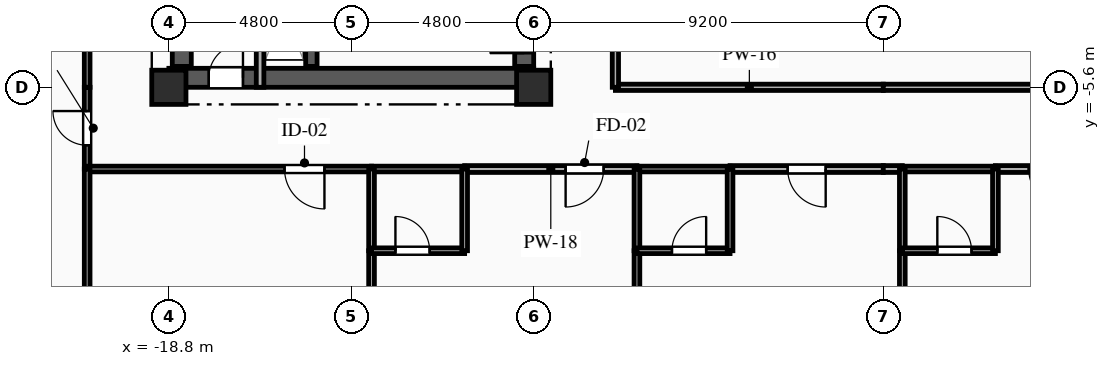
"""IFC4 building model, lengths in metres.
Left out: names, types, materials, properties, quantities, classifications, styles, units other than length and angle.
Written with IfcOpenShell. Run it as: python <this file> out.ifc"""

import sys

from ifc_helpers import new_model, si_unit, direction, frame, frame_2d, origin, origin_2d, place, context, subcontext, project, spatial, rectangle, extrude, element, fill, save


model = new_model("IFC4")
c1 = context("Model", 3, precision=1e-05, world=origin(), true_north=direction((0.0, 1.0)))
c2 = subcontext(c1, "Body", "Model", "MODEL_VIEW")
j1 = project(units=[si_unit("LENGTHUNIT", "METRE"), si_unit("PLANEANGLEUNIT", "RADIAN")], contexts=[c1])
p1 = place(None, origin())
s1 = spatial("IfcSite", under=j1, at=p1, CompositionType="ELEMENT")
p2 = place(p1, origin())
s2 = spatial("IfcBuilding", under=s1, at=p2, CompositionType="ELEMENT")
p3 = place(p2, frame((0.0, 0.0, 161.15)))
s3 = spatial("IfcBuildingStorey", under=s2, at=p3, CompositionType="ELEMENT", Elevation=161.15)
for number, where, z_axis, x_axis in (
    (1, (-18.8, -5.6, 0.0), (0.0, 0.0, 1.0), (1.0, 0.0, 0.0)),
    (2, (-9.2, -5.6, 0.0), (0.0, 0.0, 1.0), (1.0, 0.0, 0.0)),
):
    element("IfcColumn", number, at=place(p3, frame(where, z_axis=z_axis, x_axis=x_axis)), inside=s3, PredefinedType="COLUMN", context=c2, shape_type="SweptSolid", body=[
        extrude(rectangle(XDim=0.9, YDim=0.9, at=origin_2d()), origin(), (0.0, 0.0, 1.0), 3.35),
    ])
p4 = place(p3, frame((-18.8, -5.35, 0.0), z_axis=(0.0, 0.0, 1.0), x_axis=(1.0, 0.0, 0.0)))
e3 = element("IfcWall", 3, at=p4, inside=s3, PredefinedType="SHEAR", context=c2, shape_type="SweptSolid", body=[
    extrude(rectangle(XDim=9.6, YDim=0.5, at=frame_2d((4.8, 0.0))), origin(), (0.0, 0.0, 1.0), 3.04),
])
p5 = place(p4, frame((1.05, 0.0, 0.0)))
e4 = element("IfcOpeningElement", 4, at=p5, cuts=e3, PredefinedType="OPENING", context=c2, shape_type="SweptSolid", body=[
    extrude(rectangle(XDim=0.9, YDim=2.1, at=frame_2d((0.45, 1.05))), frame((0.0, 0.26, 0.0), z_axis=(0.0, -1.0, 0.0), x_axis=(1.0, 0.0, 0.0)), (0.0, 0.0, 1.0), 0.52),
])
p6 = place(p3, frame((-18.46, -5.05, 0.0), z_axis=(0.0, 0.0, 1.0), x_axis=(0.0, 1.0, 0.0)))
e5 = element("IfcWall", 5, at=p6, inside=s3, PredefinedType="SHEAR", context=c2, shape_type="SweptSolid", body=[
    extrude(rectangle(XDim=10.1, YDim=0.5, at=frame_2d((5.05, 0.0))), origin(), (0.0, 0.0, 1.0), 3.04),
])
p7 = place(p3, frame((-9.45, -5.05, 0.0), z_axis=(0.0, 0.0, 1.0), x_axis=(0.0, 1.0, 0.0)))
e6 = element("IfcWall", 6, at=p7, inside=s3, PredefinedType="SHEAR", context=c2, shape_type="SweptSolid", body=[
    extrude(rectangle(XDim=10.1, YDim=0.5, at=frame_2d((5.05, 0.0))), origin(), (0.0, 0.0, 1.0), 3.04),
])
p8 = place(p7, frame((7.15, 0.0, 0.0)))
e7 = element("IfcOpeningElement", 7, at=p8, cuts=e6, PredefinedType="OPENING", context=c2, shape_type="SweptSolid", body=[
    extrude(rectangle(XDim=0.9, YDim=2.1, at=frame_2d((0.45, 1.05))), frame((0.0, 0.26, 0.0), z_axis=(0.0, -1.0, 0.0), x_axis=(1.0, 0.0, 0.0)), (0.0, 0.0, 1.0), 0.52),
])
p9 = place(p7, frame((2.4, 0.0, 0.0)))
e8 = element("IfcOpeningElement", 8, at=p9, cuts=e6, PredefinedType="OPENING", context=c2, shape_type="SweptSolid", body=[
    extrude(rectangle(XDim=1.2, YDim=2.15, at=frame_2d((0.6, 1.075))), frame((0.0, 0.26, 0.0), z_axis=(0.0, -1.0, 0.0), x_axis=(1.0, 0.0, 0.0)), (0.0, 0.0, 1.0), 0.52),
])
p10 = place(p7, frame((0.35, 0.0, 0.0)))
e9 = element("IfcOpeningElement", 9, at=p10, cuts=e6, PredefinedType="OPENING", context=c2, shape_type="SweptSolid", body=[
    extrude(rectangle(XDim=0.9, YDim=2.1, at=frame_2d((0.45, 1.05))), frame((0.0, 0.26, 0.0), z_axis=(0.0, -1.0, 0.0), x_axis=(1.0, 0.0, 0.0)), (0.0, 0.0, 1.0), 0.52),
])
p11 = place(p7, frame((5.0, 0.0, 0.0)))
e10 = element("IfcOpeningElement", 10, at=p11, cuts=e6, PredefinedType="OPENING", context=c2, shape_type="SweptSolid", body=[
    extrude(rectangle(XDim=0.9, YDim=2.1, at=frame_2d((0.45, 1.05))), frame((0.0, 0.26, 0.0), z_axis=(0.0, -1.0, 0.0), x_axis=(1.0, 0.0, 0.0)), (0.0, 0.0, 1.0), 0.52),
])
p12 = place(p3, frame((-15.05, -5.05, 0.0), z_axis=(0.0, 0.0, 1.0), x_axis=(0.0, 1.0, 0.0)))
e11 = element("IfcWall", 11, at=p12, inside=s3, PredefinedType="SHEAR", context=c2, shape_type="SweptSolid", body=[
    extrude(rectangle(XDim=10.1, YDim=0.3, at=frame_2d((5.05, 0.0))), origin(), (0.0, 0.0, 1.0), 3.04),
])
p13 = place(p3, frame((-16.4, -5.6, 0.0), z_axis=(0.0, 0.0, 1.0), x_axis=(0.0, 1.0, 0.0)))
e12 = element("IfcWall", 12, at=p13, inside=s3, PredefinedType="PARTITIONING", context=c2, shape_type="SweptSolid", body=[
    extrude(rectangle(XDim=3.49, YDim=0.2, at=frame_2d((1.745, 0.0))), origin(), (0.0, 0.0, 1.0), 3.04),
])
p14 = place(p3, frame((-20.95, -7.75, 0.0), z_axis=(0.0, 0.0, 1.0), x_axis=(0.0, 1.0, 0.0)))
e13 = element("IfcWall", 13, at=p14, inside=s3, PredefinedType="PARTITIONING", context=c2, shape_type="SweptSolid", body=[
    extrude(rectangle(XDim=2.15, YDim=0.15, at=frame_2d((1.075, 0.0))), origin(), (0.0, 0.0, 1.0), 3.04),
])
p15 = place(p14, frame((0.625, 0.0, 0.0)))
e14 = element("IfcOpeningElement", 14, at=p15, cuts=e13, PredefinedType="OPENING", context=c2, shape_type="SweptSolid", body=[
    extrude(rectangle(XDim=0.9, YDim=2.1, at=frame_2d((0.45, 1.05))), frame((0.0, 0.085, 0.0), z_axis=(0.0, -1.0, 0.0), x_axis=(1.0, 0.0, 0.0)), (0.0, 0.0, 1.0), 0.17),
])
p16 = place(p3, frame((-13.467, -7.75, 0.0), z_axis=(0.0, 0.0, 1.0), x_axis=(-1.0, 0.0, 0.0)))
e15 = element("IfcWall", 15, at=p16, inside=s3, PredefinedType="PARTITIONING", context=c2, shape_type="SweptSolid", body=[
    extrude(rectangle(XDim=7.483, YDim=0.15, at=frame_2d((3.741, 0.0))), origin(), (0.0, 0.0, 1.0), 3.04),
])
p17 = place(p16, frame((1.239, 0.0, 0.0)))
e16 = element("IfcOpeningElement", 16, at=p17, cuts=e15, PredefinedType="OPENING", context=c2, shape_type="SweptSolid", body=[
    extrude(rectangle(XDim=1.05, YDim=2.15, at=frame_2d((0.525, 1.075))), frame((0.0, 0.085, 0.0), z_axis=(0.0, -1.0, 0.0), x_axis=(1.0, 0.0, 0.0)), (0.0, 0.0, 1.0), 0.17),
])
p18 = place(p3, frame((-6.483, -7.75, 0.0), z_axis=(0.0, 0.0, 1.0), x_axis=(-1.0, 0.0, 0.0)))
e17 = element("IfcWall", 17, at=p18, inside=s3, PredefinedType="PARTITIONING", context=c2, shape_type="SweptSolid", body=[
    extrude(rectangle(XDim=4.534, YDim=0.18, at=frame_2d((2.267, 0.0))), origin(), (0.0, 0.0, 1.0), 3.04),
])
p19 = place(p18, frame((0.877, 0.0, 0.0)))
e18 = element("IfcOpeningElement", 18, at=p19, cuts=e17, PredefinedType="OPENING", context=c2, shape_type="SweptSolid", body=[
    extrude(rectangle(XDim=1.0, YDim=2.15, at=frame_2d((0.5, 1.075))), frame((0.0, 0.1, 0.0), z_axis=(0.0, -1.0, 0.0), x_axis=(1.0, 0.0, 0.0)), (0.0, 0.0, 1.0), 0.2),
])
p20 = place(p3, frame((-11.017, -7.75, 0.0), z_axis=(0.0, 0.0, 1.0), x_axis=(-1.0, 0.0, 0.0)))
e19 = element("IfcWall", 19, at=p20, inside=s3, PredefinedType="PLUMBINGWALL", context=c2, shape_type="SweptSolid", body=[
    extrude(rectangle(XDim=2.45, YDim=0.15, at=frame_2d((1.225, 0.0))), origin(), (0.0, 0.0, 1.0), 3.04),
])
p21 = place(p3, frame((0.0, -7.75, 0.0), z_axis=(0.0, 0.0, 1.0), x_axis=(-1.0, 0.0, 0.0)))
e20 = element("IfcWall", 20, at=p21, inside=s3, PredefinedType="PARTITIONING", context=c2, shape_type="SweptSolid", body=[
    extrude(rectangle(XDim=4.033, YDim=0.18, at=frame_2d((2.017, 0.0))), origin(), (0.0, 0.0, 1.0), 3.04),
])
p22 = place(p21, frame((1.517, 0.0, 0.0)))
e21 = element("IfcOpeningElement", 21, at=p22, cuts=e20, PredefinedType="OPENING", context=c2, shape_type="SweptSolid", body=[
    extrude(rectangle(XDim=1.0, YDim=2.15, at=frame_2d((0.5, 1.075))), frame((0.0, 0.1, 0.0), z_axis=(0.0, -1.0, 0.0), x_axis=(1.0, 0.0, 0.0)), (0.0, 0.0, 1.0), 0.2),
])
p23 = place(p3, frame((-4.033, -7.75, 0.0), z_axis=(0.0, 0.0, 1.0), x_axis=(-1.0, 0.0, 0.0)))
e22 = element("IfcWall", 22, at=p23, inside=s3, PredefinedType="PLUMBINGWALL", context=c2, shape_type="SweptSolid", body=[
    extrude(rectangle(XDim=2.45, YDim=0.15, at=frame_2d((1.225, 0.0))), origin(), (0.0, 0.0, 1.0), 3.04),
])
p24 = place(p3, frame((-7.05, -5.6, 0.0), z_axis=(0.0, 0.0, 1.0), x_axis=(1.0, 0.0, 0.0)))
e23 = element("IfcWall", 23, at=p24, inside=s3, PredefinedType="PARTITIONING", context=c2, shape_type="SweptSolid", body=[
    extrude(rectangle(XDim=7.05, YDim=0.165, at=frame_2d((3.525, 0.0))), origin(), (0.0, 0.0, 1.0), 2.525),
])
p25 = place(p3, frame((0.5, -7.75, 0.0), z_axis=(0.0, 0.0, 1.0), x_axis=(-1.0, 0.0, 0.0)))
e24 = element("IfcWall", 24, at=p25, inside=s3, PredefinedType="PARTITIONING", context=c2, shape_type="SweptSolid", body=[
    extrude(rectangle(XDim=0.5, YDim=0.18, at=frame_2d((0.25, 0.0))), origin(), (0.0, 0.0, 1.0), 3.04),
])
p26 = place(p3, frame((7.483, -7.75, 0.0), z_axis=(0.0, 0.0, 1.0), x_axis=(-1.0, 0.0, 0.0)))
e25 = element("IfcWall", 25, at=p26, inside=s3, PredefinedType="PARTITIONING", context=c2, shape_type="SweptSolid", body=[
    extrude(rectangle(XDim=4.533, YDim=0.18, at=frame_2d((2.267, 0.0))), origin(), (0.0, 0.0, 1.0), 3.04),
])
p27 = place(p26, frame((2.656, 0.0, 0.0)))
e26 = element("IfcOpeningElement", 26, at=p27, cuts=e25, PredefinedType="OPENING", context=c2, shape_type="SweptSolid", body=[
    extrude(rectangle(XDim=1.0, YDim=2.15, at=frame_2d((0.5, 1.075))), frame((0.0, 0.1, 0.0), z_axis=(0.0, -1.0, 0.0), x_axis=(1.0, 0.0, 0.0)), (0.0, 0.0, 1.0), 0.2),
])
p28 = place(p3, frame((2.95, -7.75, 0.0), z_axis=(0.0, 0.0, 1.0), x_axis=(-1.0, 0.0, 0.0)))
e27 = element("IfcWall", 27, at=p28, inside=s3, PredefinedType="PLUMBINGWALL", context=c2, shape_type="SweptSolid", body=[
    extrude(rectangle(XDim=2.45, YDim=0.15, at=frame_2d((1.225, 0.0))), origin(), (0.0, 0.0, 1.0), 3.04),
])
p29 = place(p3, frame((0.0, -5.6, 0.0), z_axis=(0.0, 0.0, 1.0), x_axis=(1.0, 0.0, 0.0)))
e28 = element("IfcWall", 28, at=p29, inside=s3, PredefinedType="PARTITIONING", context=c2, shape_type="SweptSolid", body=[
    extrude(rectangle(XDim=7.05, YDim=0.165, at=frame_2d((3.525, 0.0))), origin(), (0.0, 0.0, 1.0), 2.525),
])
p30 = place(p3, frame((-20.95, -5.6, 0.0), z_axis=(0.0, 0.0, 1.0), x_axis=(0.0, 1.0, 0.0)))
e29 = element("IfcWall", 29, at=p30, inside=s3, PredefinedType="PARTITIONING", context=c2, shape_type="SweptSolid", body=[
    extrude(rectangle(XDim=2.14, YDim=0.15, at=frame_2d((1.07, 0.0))), origin(), (0.0, 0.0, 1.0), 3.04),
])
p31 = place(p3, frame((-7.05, -2.95, 0.0), z_axis=(0.0, 0.0, 1.0), x_axis=(0.0, -1.0, 0.0)))
e30 = element("IfcWall", 30, at=p31, inside=s3, PredefinedType="PARTITIONING", context=c2, shape_type="SweptSolid", body=[
    extrude(rectangle(XDim=2.65, YDim=0.165, at=frame_2d((1.325, 0.0))), origin(), (0.0, 0.0, 1.0), 3.04),
])
p32 = place(p3, frame((-20.95, -7.75, 0.0), z_axis=(0.0, 0.0, 1.0), x_axis=(0.0, -1.0, 0.0)))
e31 = element("IfcWall", 31, at=p32, inside=s3, PredefinedType="PARTITIONING", context=c2, shape_type="SweptSolid", body=[
    extrude(rectangle(XDim=7.85, YDim=0.15, at=frame_2d((3.925, 0.0))), origin(), (0.0, 0.0, 1.0), 3.04),
])
p33 = place(p3, frame((-13.467, -9.9, 0.0), z_axis=(0.0, 0.0, 1.0), x_axis=(0.0, -1.0, 0.0)))
e32 = element("IfcWall", 32, at=p33, inside=s3, PredefinedType="PARTITIONING", context=c2, shape_type="SweptSolid", body=[
    extrude(rectangle(XDim=5.7, YDim=0.15, at=frame_2d((2.85, 0.0))), origin(), (0.0, 0.0, 1.0), 3.04),
])
p34 = place(p3, frame((-13.467, -7.75, 0.0), z_axis=(0.0, 0.0, 1.0), x_axis=(0.0, -1.0, 0.0)))
e33 = element("IfcWall", 33, at=p34, inside=s3, PredefinedType="PLUMBINGWALL", context=c2, shape_type="SweptSolid", body=[
    extrude(rectangle(XDim=2.15, YDim=0.15, at=frame_2d((1.075, 0.0))), origin(), (0.0, 0.0, 1.0), 3.04),
])
p35 = place(p3, frame((-13.467, -9.9, 0.0), z_axis=(0.0, 0.0, 1.0), x_axis=(1.0, 0.0, 0.0)))
e34 = element("IfcWall", 34, at=p35, inside=s3, PredefinedType="PLUMBINGWALL", context=c2, shape_type="SweptSolid", body=[
    extrude(rectangle(XDim=2.45, YDim=0.15, at=frame_2d((1.225, 0.0))), origin(), (0.0, 0.0, 1.0), 3.04),
])
p36 = place(p35, frame((0.629, 0.0, 0.0)))
e35 = element("IfcOpeningElement", 35, at=p36, cuts=e34, PredefinedType="OPENING", context=c2, shape_type="SweptSolid", body=[
    extrude(rectangle(XDim=0.9, YDim=2.1, at=frame_2d((0.45, 1.05))), frame((0.0, 0.085, 0.0), z_axis=(0.0, -1.0, 0.0), x_axis=(1.0, 0.0, 0.0)), (0.0, 0.0, 1.0), 0.17),
])
p37 = place(p3, frame((-11.017, -9.9, 0.0), z_axis=(0.0, 0.0, 1.0), x_axis=(0.0, 1.0, 0.0)))
e36 = element("IfcWall", 36, at=p37, inside=s3, PredefinedType="PLUMBINGWALL", context=c2, shape_type="SweptSolid", body=[
    extrude(rectangle(XDim=2.15, YDim=0.15, at=frame_2d((1.075, 0.0))), origin(), (0.0, 0.0, 1.0), 3.04),
])
p38 = place(p3, frame((-6.483, -9.9, 0.0), z_axis=(0.0, 0.0, 1.0), x_axis=(0.0, -1.0, 0.0)))
e37 = element("IfcWall", 37, at=p38, inside=s3, PredefinedType="PARTITIONING", context=c2, shape_type="SweptSolid", body=[
    extrude(rectangle(XDim=5.7, YDim=0.15, at=frame_2d((2.85, 0.0))), origin(), (0.0, 0.0, 1.0), 3.04),
])
p39 = place(p3, frame((-6.483, -7.75, 0.0), z_axis=(0.0, 0.0, 1.0), x_axis=(0.0, -1.0, 0.0)))
e38 = element("IfcWall", 38, at=p39, inside=s3, PredefinedType="PLUMBINGWALL", context=c2, shape_type="SweptSolid", body=[
    extrude(rectangle(XDim=2.15, YDim=0.15, at=frame_2d((1.075, 0.0))), origin(), (0.0, 0.0, 1.0), 3.04),
])
p40 = place(p3, frame((-6.483, -9.9, 0.0), z_axis=(0.0, 0.0, 1.0), x_axis=(1.0, 0.0, 0.0)))
e39 = element("IfcWall", 39, at=p40, inside=s3, PredefinedType="PLUMBINGWALL", context=c2, shape_type="SweptSolid", body=[
    extrude(rectangle(XDim=2.45, YDim=0.15, at=frame_2d((1.225, 0.0))), origin(), (0.0, 0.0, 1.0), 3.04),
])
p41 = place(p40, frame((0.921, 0.0, 0.0)))
e40 = element("IfcOpeningElement", 40, at=p41, cuts=e39, PredefinedType="OPENING", context=c2, shape_type="SweptSolid", body=[
    extrude(rectangle(XDim=0.9, YDim=2.1, at=frame_2d((0.45, 1.05))), frame((0.0, 0.085, 0.0), z_axis=(0.0, -1.0, 0.0), x_axis=(1.0, 0.0, 0.0)), (0.0, 0.0, 1.0), 0.17),
])
p42 = place(p3, frame((-4.033, -9.9, 0.0), z_axis=(0.0, 0.0, 1.0), x_axis=(0.0, 1.0, 0.0)))
e41 = element("IfcWall", 41, at=p42, inside=s3, PredefinedType="PLUMBINGWALL", context=c2, shape_type="SweptSolid", body=[
    extrude(rectangle(XDim=2.15, YDim=0.15, at=frame_2d((1.075, 0.0))), origin(), (0.0, 0.0, 1.0), 3.04),
])
p43 = place(p3, frame((0.5, -9.9, 0.0), z_axis=(0.0, 0.0, 1.0), x_axis=(0.0, -1.0, 0.0)))
e42 = element("IfcWall", 42, at=p43, inside=s3, PredefinedType="PARTITIONING", context=c2, shape_type="SweptSolid", body=[
    extrude(rectangle(XDim=5.7, YDim=0.15, at=frame_2d((2.85, 0.0))), origin(), (0.0, 0.0, 1.0), 3.04),
])
p44 = place(p3, frame((0.5, -7.75, 0.0), z_axis=(0.0, 0.0, 1.0), x_axis=(0.0, -1.0, 0.0)))
e43 = element("IfcWall", 43, at=p44, inside=s3, PredefinedType="PLUMBINGWALL", context=c2, shape_type="SweptSolid", body=[
    extrude(rectangle(XDim=2.15, YDim=0.15, at=frame_2d((1.075, 0.0))), origin(), (0.0, 0.0, 1.0), 3.04),
])
p45 = place(p3, frame((0.5, -9.9, 0.0), z_axis=(0.0, 0.0, 1.0), x_axis=(1.0, 0.0, 0.0)))
e44 = element("IfcWall", 44, at=p45, inside=s3, PredefinedType="PLUMBINGWALL", context=c2, shape_type="SweptSolid", body=[
    extrude(rectangle(XDim=2.45, YDim=0.15, at=frame_2d((1.225, 0.0))), origin(), (0.0, 0.0, 1.0), 3.04),
])
p46 = place(p45, frame((0.921, 0.0, 0.0)))
e45 = element("IfcOpeningElement", 45, at=p46, cuts=e44, PredefinedType="OPENING", context=c2, shape_type="SweptSolid", body=[
    extrude(rectangle(XDim=0.9, YDim=2.1, at=frame_2d((0.45, 1.05))), frame((0.0, 0.085, 0.0), z_axis=(0.0, -1.0, 0.0), x_axis=(1.0, 0.0, 0.0)), (0.0, 0.0, 1.0), 0.17),
])
p47 = place(p3, frame((2.95, -9.9, 0.0), z_axis=(0.0, 0.0, 1.0), x_axis=(0.0, 1.0, 0.0)))
e46 = element("IfcWall", 46, at=p47, inside=s3, PredefinedType="PLUMBINGWALL", context=c2, shape_type="SweptSolid", body=[
    extrude(rectangle(XDim=2.15, YDim=0.15, at=frame_2d((1.075, 0.0))), origin(), (0.0, 0.0, 1.0), 3.04),
])
p48 = place(p5, origin())
e47 = element("IfcDoor", 47, at=p48, inside=s3, OperationType="SINGLE_SWING_RIGHT", PredefinedType="DOOR", context=c2, shape_type="SweptSolid", body=[
    extrude(rectangle(XDim=0.9, YDim=2.1, at=frame_2d((0.45, 1.05))), frame((0.0, 0.025, 0.0), z_axis=(0.0, -1.0, 0.0), x_axis=(1.0, 0.0, 0.0)), (0.0, 0.0, 1.0), 0.05),
])
fill(e4, e47)
p49 = place(p10, origin())
e48 = element("IfcDoor", 48, at=p49, inside=s3, OperationType="SINGLE_SWING_LEFT", PredefinedType="DOOR", context=c2, shape_type="SweptSolid", body=[
    extrude(rectangle(XDim=0.9, YDim=2.1, at=frame_2d((0.45, 1.05))), frame((0.0, 0.025, 0.0), z_axis=(0.0, -1.0, 0.0), x_axis=(1.0, 0.0, 0.0)), (0.0, 0.0, 1.0), 0.05),
])
fill(e9, e48)
p50 = place(p15, origin())
e49 = element("IfcDoor", 49, at=p50, inside=s3, OperationType="SINGLE_SWING_RIGHT", PredefinedType="DOOR", context=c2, shape_type="SweptSolid", body=[
    extrude(rectangle(XDim=0.9, YDim=2.1, at=frame_2d((0.45, 1.05))), frame((0.0, 0.025, 0.0), z_axis=(0.0, -1.0, 0.0), x_axis=(1.0, 0.0, 0.0)), (0.0, 0.0, 1.0), 0.05),
])
fill(e14, e49)
p51 = place(p17, origin())
e50 = element("IfcDoor", 50, at=p51, inside=s3, OperationType="SINGLE_SWING_LEFT", PredefinedType="DOOR", context=c2, shape_type="SweptSolid", body=[
    extrude(rectangle(XDim=1.05, YDim=2.15, at=frame_2d((0.525, 1.075))), frame((0.0, 0.025, 0.0), z_axis=(0.0, -1.0, 0.0), x_axis=(1.0, 0.0, 0.0)), (0.0, 0.0, 1.0), 0.05),
])
fill(e16, e50)
p52 = place(p19, origin())
e51 = element("IfcDoor", 51, at=p52, inside=s3, OperationType="SINGLE_SWING_RIGHT", PredefinedType="DOOR", context=c2, shape_type="SweptSolid", body=[
    extrude(rectangle(XDim=1.0, YDim=2.15, at=frame_2d((0.5, 1.075))), frame((0.0, 0.025, 0.0), z_axis=(0.0, -1.0, 0.0), x_axis=(1.0, 0.0, 0.0)), (0.0, 0.0, 1.0), 0.05),
])
fill(e18, e51)
p53 = place(p22, origin())
e52 = element("IfcDoor", 52, at=p53, inside=s3, OperationType="SINGLE_SWING_LEFT", PredefinedType="DOOR", context=c2, shape_type="SweptSolid", body=[
    extrude(rectangle(XDim=1.0, YDim=2.15, at=frame_2d((0.5, 1.075))), frame((0.0, 0.025, 0.0), z_axis=(0.0, -1.0, 0.0), x_axis=(1.0, 0.0, 0.0)), (0.0, 0.0, 1.0), 0.05),
])
fill(e21, e52)
p54 = place(p27, origin())
e53 = element("IfcDoor", 53, at=p54, inside=s3, OperationType="SINGLE_SWING_LEFT", PredefinedType="DOOR", context=c2, shape_type="SweptSolid", body=[
    extrude(rectangle(XDim=1.0, YDim=2.15, at=frame_2d((0.5, 1.075))), frame((0.0, 0.025, 0.0), z_axis=(0.0, -1.0, 0.0), x_axis=(1.0, 0.0, 0.0)), (0.0, 0.0, 1.0), 0.05),
])
fill(e26, e53)
p55 = place(p36, origin())
e54 = element("IfcDoor", 54, at=p55, inside=s3, OperationType="SINGLE_SWING_LEFT", PredefinedType="DOOR", context=c2, shape_type="SweptSolid", body=[
    extrude(rectangle(XDim=0.9, YDim=2.1, at=frame_2d((0.45, 1.05))), frame((0.0, 0.025, 0.0), z_axis=(0.0, -1.0, 0.0), x_axis=(1.0, 0.0, 0.0)), (0.0, 0.0, 1.0), 0.05),
])
fill(e35, e54)
p56 = place(p41, origin())
e55 = element("IfcDoor", 55, at=p56, inside=s3, OperationType="SINGLE_SWING_RIGHT", PredefinedType="DOOR", context=c2, shape_type="SweptSolid", body=[
    extrude(rectangle(XDim=0.9, YDim=2.1, at=frame_2d((0.45, 1.05))), frame((0.0, 0.025, 0.0), z_axis=(0.0, -1.0, 0.0), x_axis=(1.0, 0.0, 0.0)), (0.0, 0.0, 1.0), 0.05),
])
fill(e40, e55)
p57 = place(p46, origin())
e56 = element("IfcDoor", 56, at=p57, inside=s3, OperationType="SINGLE_SWING_LEFT", PredefinedType="DOOR", context=c2, shape_type="SweptSolid", body=[
    extrude(rectangle(XDim=0.9, YDim=2.1, at=frame_2d((0.45, 1.05))), frame((0.0, 0.025, 0.0), z_axis=(0.0, -1.0, 0.0), x_axis=(1.0, 0.0, 0.0)), (0.0, 0.0, 1.0), 0.05),
])
fill(e45, e56)
save(model, sys.argv[1])
